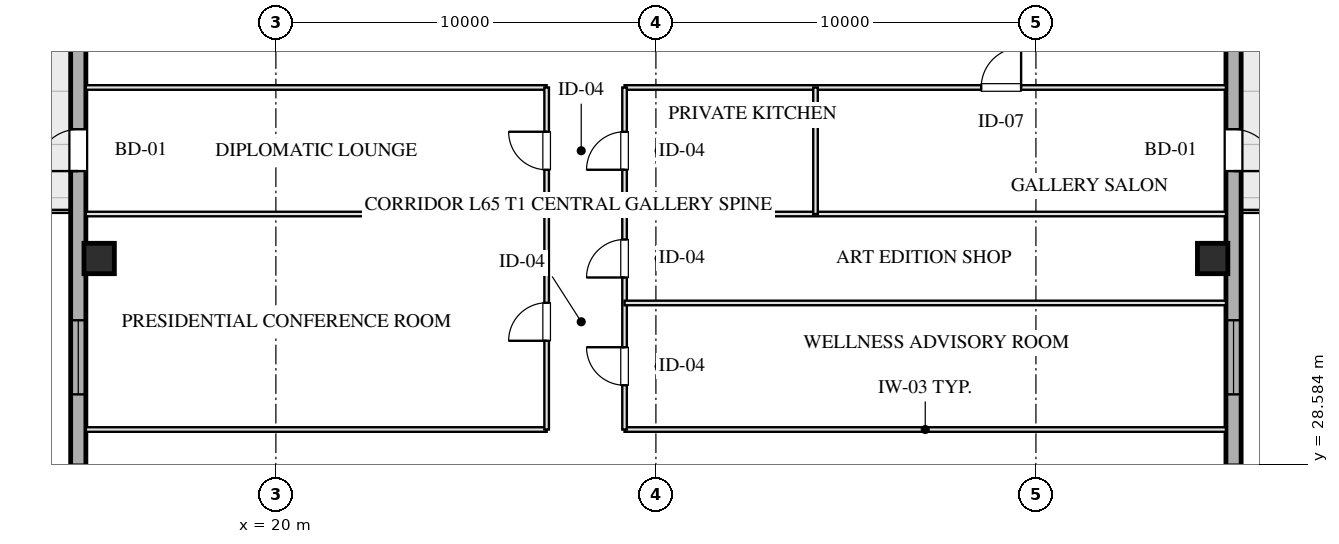
"""IFC4 building model, lengths in metres.
Left out: names, types, materials, properties, quantities, classifications, styles, units other than length and angle.
Written with IfcOpenShell. Run it as: python <this file> out.ifc"""

import sys

from ifc_helpers import new_model, si_unit, direction, frame, frame_2d, origin, origin_2d, place, context, subcontext, project, spatial, rectangle, hollow_rectangle, extrude, element, fill, save


model = new_model("IFC4")
c1 = context("Model", 3, precision=1e-05, world=origin(), true_north=direction((0.0, 1.0)))
c2 = subcontext(c1, "Body", "Model", "MODEL_VIEW")
j1 = project(units=[si_unit("LENGTHUNIT", "METRE"), si_unit("PLANEANGLEUNIT", "RADIAN")], contexts=[c1])
p1 = place(None, origin())
s1 = spatial("IfcSite", under=j1, at=p1, CompositionType="ELEMENT")
p2 = place(p1, origin())
s2 = spatial("IfcBuilding", under=s1, at=p2, CompositionType="ELEMENT")
p3 = place(p2, frame((0.0, 0.0, 240.8)))
s3 = spatial("IfcBuildingStorey", under=s2, at=p3, CompositionType="ELEMENT", Elevation=240.8)
for number, where, z_axis, x_axis in (
    (1, (15.35, 34.0, 0.0), (0.0, 0.0, 1.0), (1.0, 0.0, 0.0)),
    (2, (44.65, 34.0, 0.0), (0.0, 0.0, 1.0), (1.0, 0.0, 0.0)),
):
    element("IfcColumn", number, at=place(p3, frame(where, z_axis=z_axis, x_axis=x_axis)), inside=s3, PredefinedType="COLUMN", context=c2, shape_type="SweptSolid", body=[
        extrude(hollow_rectangle(XDim=0.8, YDim=0.8, WallThickness=0.028, at=origin_2d()), origin(), (0.0, 0.0, 1.0), 3.201),
    ])
p4 = place(p3, frame((14.8, 13.1, 0.0), z_axis=(0.0, 0.0, 1.0), x_axis=(0.0, 1.0, 0.0)))
e3 = element("IfcWall", 3, at=p4, inside=s3, PredefinedType="SOLIDWALL", context=c2, shape_type="SweptSolid", body=[
    extrude(rectangle(XDim=41.8, YDim=0.4, at=frame_2d((20.9, 0.0))), origin(), (0.0, 0.0, 1.0), 2.36),
])
p5 = place(p4, frame((13.525, 0.0, 0.75)))
e4 = element("IfcOpeningElement", 4, at=p5, cuts=e3, PredefinedType="OPENING", context=c2, shape_type="SweptSolid", body=[
    extrude(rectangle(XDim=1.95, YDim=1.21, at=frame_2d((0.975, 0.605))), frame((0.0, 0.21, 0.0), z_axis=(0.0, -1.0, 0.0), x_axis=(1.0, 0.0, 0.0)), (0.0, 0.0, 1.0), 0.42),
])
p6 = place(p4, frame((17.325, 0.0, 0.75)))
e5 = element("IfcOpeningElement", 5, at=p6, cuts=e3, PredefinedType="OPENING", context=c2, shape_type="SweptSolid", body=[
    extrude(rectangle(XDim=1.95, YDim=1.21, at=frame_2d((0.975, 0.605))), frame((0.0, 0.21, 0.0), z_axis=(0.0, -1.0, 0.0), x_axis=(1.0, 0.0, 0.0)), (0.0, 0.0, 1.0), 0.42),
])
p7 = place(p4, frame((23.2, 0.0, 0.0)))
e6 = element("IfcOpeningElement", 6, at=p7, cuts=e3, PredefinedType="OPENING", context=c2, shape_type="SweptSolid", body=[
    extrude(rectangle(XDim=1.1, YDim=2.15, at=frame_2d((0.55, 1.075))), frame((0.0, 0.21, 0.0), z_axis=(0.0, -1.0, 0.0), x_axis=(1.0, 0.0, 0.0)), (0.0, 0.0, 1.0), 0.42),
])
p8 = place(p3, frame((45.2, 54.9, 0.0), z_axis=(0.0, 0.0, 1.0), x_axis=(0.0, -1.0, 0.0)))
e7 = element("IfcWall", 7, at=p8, inside=s3, PredefinedType="SOLIDWALL", context=c2, shape_type="SweptSolid", body=[
    extrude(rectangle(XDim=41.8, YDim=0.4, at=frame_2d((20.9, 0.0))), origin(), (0.0, 0.0, 1.0), 2.36),
])
p9 = place(p8, frame((26.325, 0.0, 0.75)))
e8 = element("IfcOpeningElement", 8, at=p9, cuts=e7, PredefinedType="OPENING", context=c2, shape_type="SweptSolid", body=[
    extrude(rectangle(XDim=1.95, YDim=1.21, at=frame_2d((0.975, 0.605))), frame((0.0, 0.21, 0.0), z_axis=(0.0, -1.0, 0.0), x_axis=(1.0, 0.0, 0.0)), (0.0, 0.0, 1.0), 0.42),
])
p10 = place(p8, frame((22.525, 0.0, 0.75)))
e9 = element("IfcOpeningElement", 9, at=p10, cuts=e7, PredefinedType="OPENING", context=c2, shape_type="SweptSolid", body=[
    extrude(rectangle(XDim=1.95, YDim=1.21, at=frame_2d((0.975, 0.605))), frame((0.0, 0.21, 0.0), z_axis=(0.0, -1.0, 0.0), x_axis=(1.0, 0.0, 0.0)), (0.0, 0.0, 1.0), 0.42),
])
p11 = place(p8, frame((17.5, 0.0, 0.0)))
e10 = element("IfcOpeningElement", 10, at=p11, cuts=e7, PredefinedType="OPENING", context=c2, shape_type="SweptSolid", body=[
    extrude(rectangle(XDim=1.1, YDim=2.15, at=frame_2d((0.55, 1.075))), frame((0.0, 0.21, 0.0), z_axis=(0.0, -1.0, 0.0), x_axis=(1.0, 0.0, 0.0)), (0.0, 0.0, 1.0), 0.42),
])
p12 = place(p3, frame((15.0, 29.5, 0.0), z_axis=(0.0, 0.0, 1.0), x_axis=(1.0, 0.0, 0.0)))
e11 = element("IfcWall", 11, at=p12, inside=s3, PredefinedType="PARTITIONING", context=c2, shape_type="SweptSolid", body=[
    extrude(rectangle(XDim=12.125, YDim=0.12, at=frame_2d((6.062, 0.0))), origin(), (0.0, 0.0, 1.0), 2.925),
])
p13 = place(p3, frame((29.175, 29.5, 0.0), z_axis=(0.0, 0.0, 1.0), x_axis=(1.0, 0.0, 0.0)))
e12 = element("IfcWall", 12, at=p13, inside=s3, PredefinedType="PARTITIONING", context=c2, shape_type="SweptSolid", body=[
    extrude(rectangle(XDim=15.825, YDim=0.12, at=frame_2d((7.913, 0.0))), origin(), (0.0, 0.0, 1.0), 2.925),
])
p14 = place(p3, frame((15.0, 38.5, 0.0), z_axis=(0.0, 0.0, 1.0), x_axis=(1.0, 0.0, 0.0)))
e13 = element("IfcWall", 13, at=p14, inside=s3, PredefinedType="PARTITIONING", context=c2, shape_type="SweptSolid", body=[
    extrude(rectangle(XDim=12.125, YDim=0.12, at=frame_2d((6.062, 0.0))), origin(), (0.0, 0.0, 1.0), 2.925),
])
p15 = place(p3, frame((29.175, 38.5, 0.0), z_axis=(0.0, 0.0, 1.0), x_axis=(1.0, 0.0, 0.0)))
e14 = element("IfcWall", 14, at=p15, inside=s3, PredefinedType="PARTITIONING", context=c2, shape_type="SweptSolid", body=[
    extrude(rectangle(XDim=15.825, YDim=0.12, at=frame_2d((7.913, 0.0))), origin(), (0.0, 0.0, 1.0), 2.925),
])
p16 = place(p15, frame((9.385, 0.0, 0.0)))
e15 = element("IfcOpeningElement", 15, at=p16, cuts=e14, PredefinedType="OPENING", context=c2, shape_type="SweptSolid", body=[
    extrude(rectangle(XDim=1.05, YDim=2.05, at=frame_2d((0.525, 1.025))), frame((0.0, 0.07, 0.0), z_axis=(0.0, -1.0, 0.0), x_axis=(1.0, 0.0, 0.0)), (0.0, 0.0, 1.0), 0.14),
])
p17 = place(p3, frame((27.125, 29.5, 0.0), z_axis=(0.0, 0.0, 1.0), x_axis=(0.0, 1.0, 0.0)))
e16 = element("IfcWall", 16, at=p17, inside=s3, PredefinedType="PARTITIONING", context=c2, shape_type="SweptSolid", body=[
    extrude(rectangle(XDim=9.0, YDim=0.12, at=frame_2d((4.5, 0.0))), origin(), (0.0, 0.0, 1.0), 2.925),
])
p18 = place(p17, frame((2.335, 0.0, 0.0)))
e17 = element("IfcOpeningElement", 17, at=p18, cuts=e16, PredefinedType="OPENING", context=c2, shape_type="SweptSolid", body=[
    extrude(rectangle(XDim=1.0, YDim=2.05, at=frame_2d((0.5, 1.025))), frame((0.0, 0.07, 0.0), z_axis=(0.0, -1.0, 0.0), x_axis=(1.0, 0.0, 0.0)), (0.0, 0.0, 1.0), 0.14),
])
p19 = place(p17, frame((6.835, 0.0, 0.0)))
e18 = element("IfcOpeningElement", 18, at=p19, cuts=e16, PredefinedType="OPENING", context=c2, shape_type="SweptSolid", body=[
    extrude(rectangle(XDim=1.0, YDim=2.05, at=frame_2d((0.5, 1.025))), frame((0.0, 0.07, 0.0), z_axis=(0.0, -1.0, 0.0), x_axis=(1.0, 0.0, 0.0)), (0.0, 0.0, 1.0), 0.14),
])
p20 = place(p3, frame((29.175, 29.5, 0.0), z_axis=(0.0, 0.0, 1.0), x_axis=(0.0, 1.0, 0.0)))
e19 = element("IfcWall", 19, at=p20, inside=s3, PredefinedType="PARTITIONING", context=c2, shape_type="SweptSolid", body=[
    extrude(rectangle(XDim=9.0, YDim=0.12, at=frame_2d((4.5, 0.0))), origin(), (0.0, 0.0, 1.0), 2.925),
])
p21 = place(p20, frame((1.165, 0.0, 0.0)))
e20 = element("IfcOpeningElement", 20, at=p21, cuts=e19, PredefinedType="OPENING", context=c2, shape_type="SweptSolid", body=[
    extrude(rectangle(XDim=1.0, YDim=2.05, at=frame_2d((0.5, 1.025))), frame((0.0, 0.07, 0.0), z_axis=(0.0, -1.0, 0.0), x_axis=(1.0, 0.0, 0.0)), (0.0, 0.0, 1.0), 0.14),
])
p22 = place(p20, frame((4.0, 0.0, 0.0)))
e21 = element("IfcOpeningElement", 21, at=p22, cuts=e19, PredefinedType="OPENING", context=c2, shape_type="SweptSolid", body=[
    extrude(rectangle(XDim=1.0, YDim=2.05, at=frame_2d((0.5, 1.025))), frame((0.0, 0.07, 0.0), z_axis=(0.0, -1.0, 0.0), x_axis=(1.0, 0.0, 0.0)), (0.0, 0.0, 1.0), 0.14),
])
p23 = place(p20, frame((6.835, 0.0, 0.0)))
e22 = element("IfcOpeningElement", 22, at=p23, cuts=e19, PredefinedType="OPENING", context=c2, shape_type="SweptSolid", body=[
    extrude(rectangle(XDim=1.0, YDim=2.05, at=frame_2d((0.5, 1.025))), frame((0.0, 0.07, 0.0), z_axis=(0.0, -1.0, 0.0), x_axis=(1.0, 0.0, 0.0)), (0.0, 0.0, 1.0), 0.14),
])
p24 = place(p3, frame((15.0, 35.17, 0.0), z_axis=(0.0, 0.0, 1.0), x_axis=(1.0, 0.0, 0.0)))
e23 = element("IfcWall", 23, at=p24, inside=s3, PredefinedType="PARTITIONING", context=c2, shape_type="SweptSolid", body=[
    extrude(rectangle(XDim=12.125, YDim=0.12, at=frame_2d((6.062, 0.0))), origin(), (0.0, 0.0, 1.0), 2.925),
])
for number, where, z_axis, x_axis in (
    (24, (29.175, 32.83, 0.0), (0.0, 0.0, 1.0), (1.0, 0.0, 0.0)),
    (25, (29.175, 35.17, 0.0), (0.0, 0.0, 1.0), (1.0, 0.0, 0.0)),
):
    element("IfcWall", number, at=place(p3, frame(where, z_axis=z_axis, x_axis=x_axis)), inside=s3, PredefinedType="PARTITIONING", context=c2, shape_type="SweptSolid", body=[
        extrude(rectangle(XDim=15.825, YDim=0.12, at=frame_2d((7.913, 0.0))), origin(), (0.0, 0.0, 1.0), 2.925),
    ])
p25 = place(p3, frame((34.2, 35.17, 0.0), z_axis=(0.0, 0.0, 1.0), x_axis=(0.0, 1.0, 0.0)))
e26 = element("IfcWall", 26, at=p25, inside=s3, PredefinedType="PARTITIONING", context=c2, shape_type="SweptSolid", body=[
    extrude(rectangle(XDim=3.33, YDim=0.12, at=frame_2d((1.665, 0.0))), origin(), (0.0, 0.0, 1.0), 2.925),
])
p26 = place(p6, origin())
e27 = element("IfcWindow", 27, at=p26, inside=s3, PartitioningType="TRIPLE_PANEL_VERTICAL", PredefinedType="WINDOW", context=c2, shape_type="SweptSolid", body=[
    extrude(rectangle(XDim=1.95, YDim=1.21, at=frame_2d((0.975, 0.605))), frame((0.0, 0.03, 0.0), z_axis=(0.0, -1.0, 0.0), x_axis=(1.0, 0.0, 0.0)), (0.0, 0.0, 1.0), 0.06),
])
fill(e5, e27)
p27 = place(p10, origin())
e28 = element("IfcWindow", 28, at=p27, inside=s3, PartitioningType="TRIPLE_PANEL_VERTICAL", PredefinedType="WINDOW", context=c2, shape_type="SweptSolid", body=[
    extrude(rectangle(XDim=1.95, YDim=1.21, at=frame_2d((0.975, 0.605))), frame((0.0, 0.03, 0.0), z_axis=(0.0, -1.0, 0.0), x_axis=(1.0, 0.0, 0.0)), (0.0, 0.0, 1.0), 0.06),
])
fill(e9, e28)
p28 = place(p7, origin())
e29 = element("IfcDoor", 29, at=p28, inside=s3, OperationType="SINGLE_SWING_LEFT", PredefinedType="DOOR", context=c2, shape_type="SweptSolid", body=[
    extrude(rectangle(XDim=1.1, YDim=2.15, at=frame_2d((0.55, 1.075))), frame((0.0, 0.025, 0.0), z_axis=(0.0, -1.0, 0.0), x_axis=(1.0, 0.0, 0.0)), (0.0, 0.0, 1.0), 0.05),
])
fill(e6, e29)
p29 = place(p11, origin())
e30 = element("IfcDoor", 30, at=p29, inside=s3, OperationType="SINGLE_SWING_RIGHT", PredefinedType="DOOR", context=c2, shape_type="SweptSolid", body=[
    extrude(rectangle(XDim=1.1, YDim=2.15, at=frame_2d((0.55, 1.075))), frame((0.0, 0.025, 0.0), z_axis=(0.0, -1.0, 0.0), x_axis=(1.0, 0.0, 0.0)), (0.0, 0.0, 1.0), 0.05),
])
fill(e10, e30)
p30 = place(p16, origin())
e31 = element("IfcDoor", 31, at=p30, inside=s3, OperationType="SINGLE_SWING_RIGHT", PredefinedType="DOOR", context=c2, shape_type="SweptSolid", body=[
    extrude(rectangle(XDim=1.05, YDim=2.05, at=frame_2d((0.525, 1.025))), frame((0.0, 0.025, 0.0), z_axis=(0.0, -1.0, 0.0), x_axis=(1.0, 0.0, 0.0)), (0.0, 0.0, 1.0), 0.05),
])
fill(e15, e31)
p31 = place(p18, origin())
e32 = element("IfcDoor", 32, at=p31, inside=s3, OperationType="SINGLE_SWING_LEFT", PredefinedType="DOOR", context=c2, shape_type="SweptSolid", body=[
    extrude(rectangle(XDim=1.0, YDim=2.05, at=frame_2d((0.5, 1.025))), frame((0.0, 0.025, 0.0), z_axis=(0.0, -1.0, 0.0), x_axis=(1.0, 0.0, 0.0)), (0.0, 0.0, 1.0), 0.05),
])
fill(e17, e32)
p32 = place(p19, origin())
e33 = element("IfcDoor", 33, at=p32, inside=s3, OperationType="SINGLE_SWING_RIGHT", PredefinedType="DOOR", context=c2, shape_type="SweptSolid", body=[
    extrude(rectangle(XDim=1.0, YDim=2.05, at=frame_2d((0.5, 1.025))), frame((0.0, 0.025, 0.0), z_axis=(0.0, -1.0, 0.0), x_axis=(1.0, 0.0, 0.0)), (0.0, 0.0, 1.0), 0.05),
])
fill(e18, e33)
p33 = place(p21, origin())
e34 = element("IfcDoor", 34, at=p33, inside=s3, OperationType="SINGLE_SWING_RIGHT", PredefinedType="DOOR", context=c2, shape_type="SweptSolid", body=[
    extrude(rectangle(XDim=1.0, YDim=2.05, at=frame_2d((0.5, 1.025))), frame((0.0, 0.025, 0.0), z_axis=(0.0, -1.0, 0.0), x_axis=(1.0, 0.0, 0.0)), (0.0, 0.0, 1.0), 0.05),
])
fill(e20, e34)
p34 = place(p22, origin())
e35 = element("IfcDoor", 35, at=p34, inside=s3, OperationType="SINGLE_SWING_LEFT", PredefinedType="DOOR", context=c2, shape_type="SweptSolid", body=[
    extrude(rectangle(XDim=1.0, YDim=2.05, at=frame_2d((0.5, 1.025))), frame((0.0, 0.025, 0.0), z_axis=(0.0, -1.0, 0.0), x_axis=(1.0, 0.0, 0.0)), (0.0, 0.0, 1.0), 0.05),
])
fill(e21, e35)
p35 = place(p23, origin())
e36 = element("IfcDoor", 36, at=p35, inside=s3, OperationType="SINGLE_SWING_LEFT", PredefinedType="DOOR", context=c2, shape_type="SweptSolid", body=[
    extrude(rectangle(XDim=1.0, YDim=2.05, at=frame_2d((0.5, 1.025))), frame((0.0, 0.025, 0.0), z_axis=(0.0, -1.0, 0.0), x_axis=(1.0, 0.0, 0.0)), (0.0, 0.0, 1.0), 0.05),
])
fill(e22, e36)
save(model, sys.argv[1])
